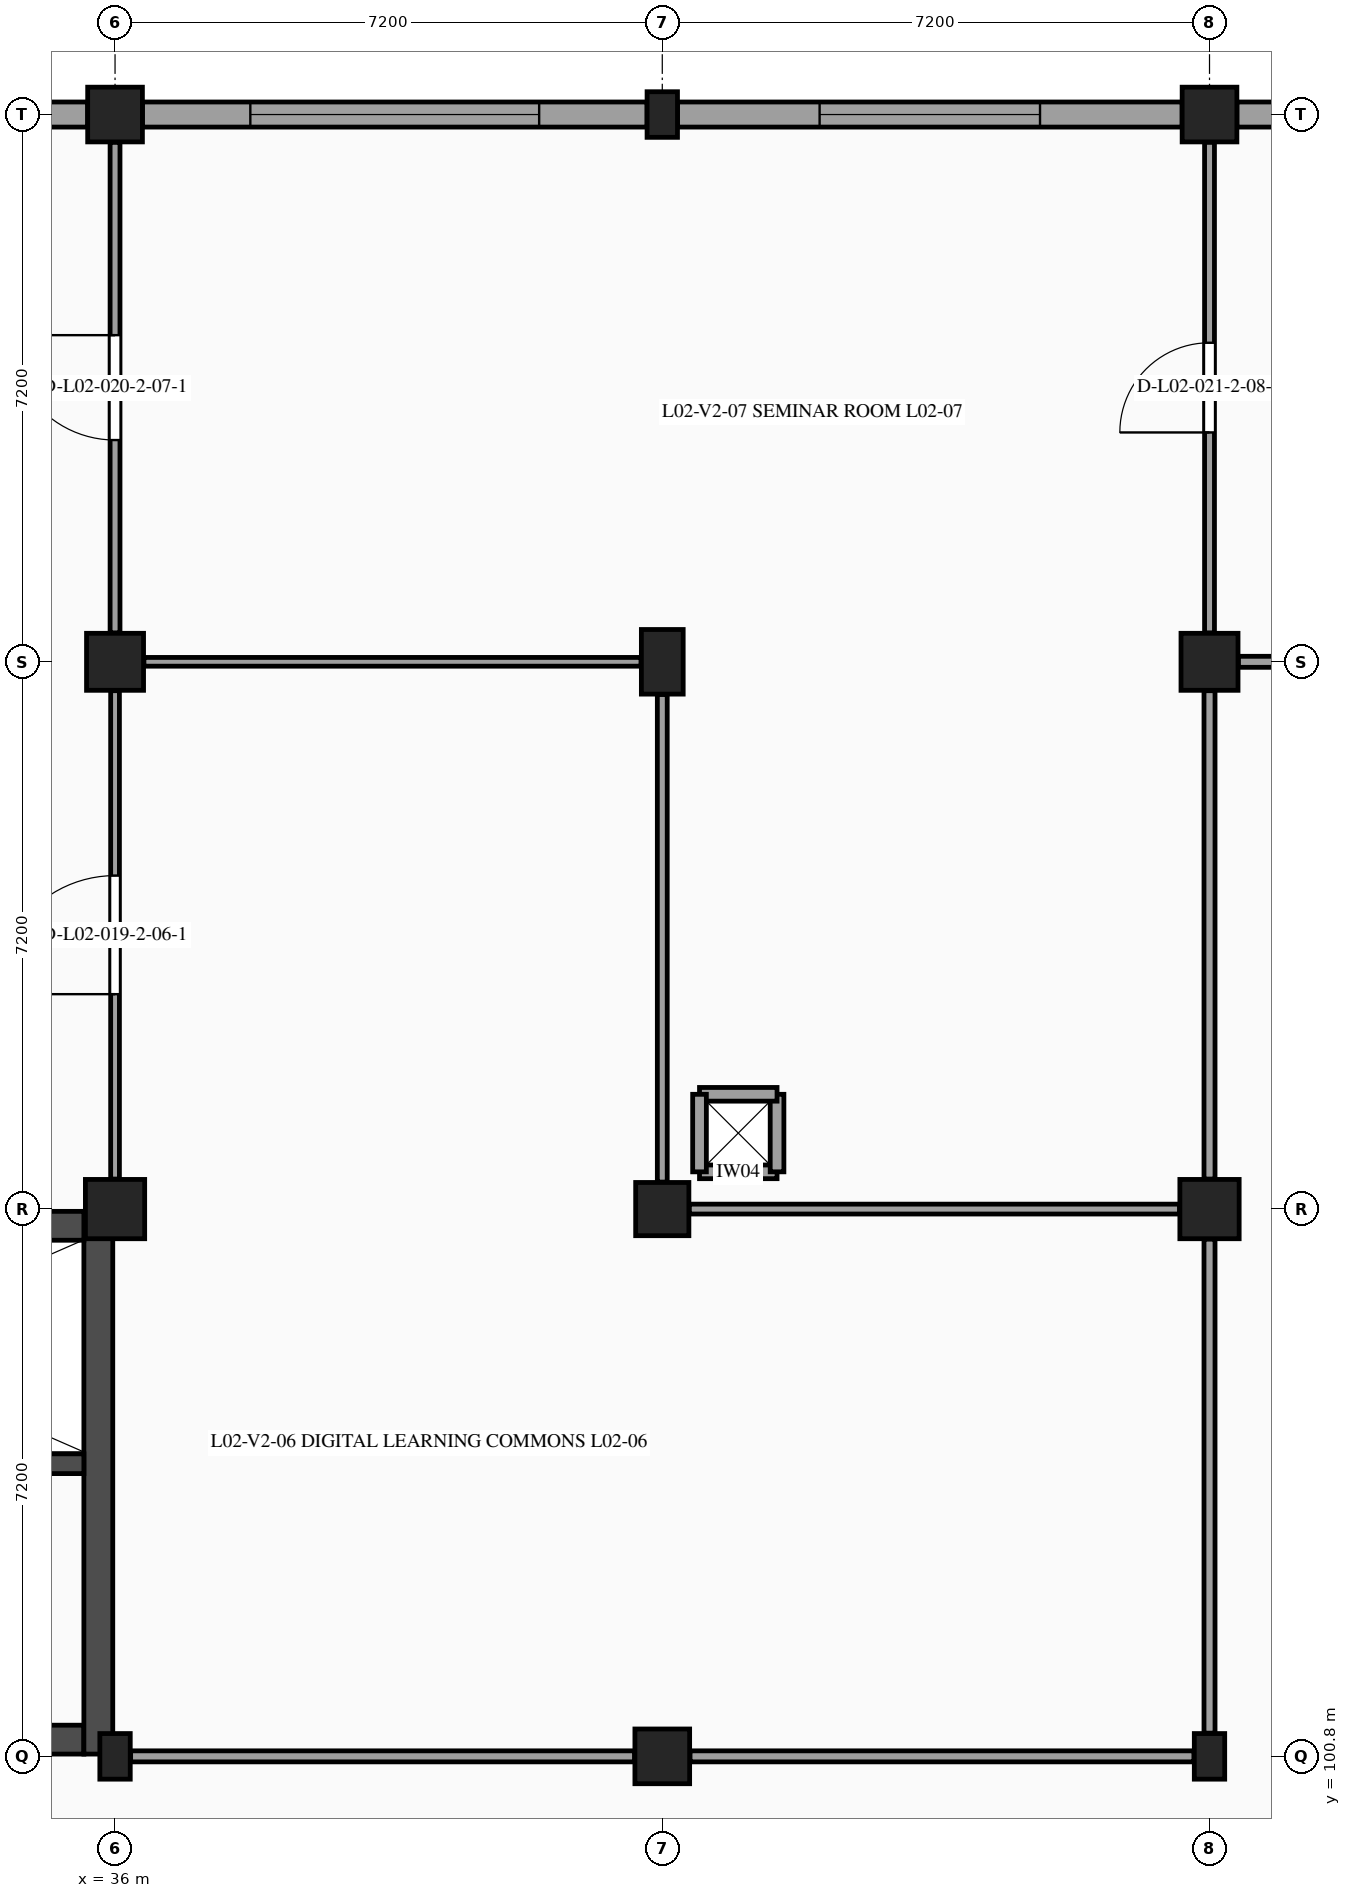
"""IFC4 building model, lengths in metres.
Left out: names, types, materials, properties, quantities, classifications, styles, units other than length and angle.
Written with IfcOpenShell. Run it as: python <this file> out.ifc"""

import sys

from ifc_helpers import new_model, si_unit, direction, frame, frame_2d, origin, origin_2d, place, context, subcontext, project, spatial, rectangle, extrude, element, fill, save


model = new_model("IFC4")
c1 = context("Model", 3, precision=1e-05, world=origin(), true_north=direction((0.0, 1.0)))
c2 = subcontext(c1, "Body", "Model", "MODEL_VIEW")
j1 = project(units=[si_unit("LENGTHUNIT", "METRE"), si_unit("PLANEANGLEUNIT", "RADIAN")], contexts=[c1])
p1 = place(None, origin())
s1 = spatial("IfcSite", under=j1, at=p1, CompositionType="ELEMENT")
p2 = place(p1, origin())
s2 = spatial("IfcBuilding", under=s1, at=p2, CompositionType="ELEMENT")
p3 = place(p2, frame((0.0, 0.0, 9.9)))
s3 = spatial("IfcBuildingStorey", under=s2, at=p3, CompositionType="ELEMENT", Elevation=9.9)
p4 = place(p3, frame((36.0, 100.8, 0.0), z_axis=(0.0, 0.0, 1.0), x_axis=(1.0, 0.0, 0.0)))
e1 = element("IfcColumn", 1, at=p4, inside=s3, PredefinedType="PILASTER", context=c2, shape_type="SweptSolid", body=[
    extrude(rectangle(XDim=0.4, YDim=0.6, at=origin_2d()), origin(), (0.0, 0.0, 1.0), 4.5),
])
p5 = place(p3, frame((36.0, 108.0, 0.0), z_axis=(0.0, 0.0, 1.0), x_axis=(1.0, 0.0, 0.0)))
e2 = element("IfcColumn", 2, at=p5, inside=s3, PredefinedType="COLUMN", context=c2, shape_type="SweptSolid", body=[
    extrude(rectangle(XDim=0.78, YDim=0.78, at=origin_2d()), origin(), (0.0, 0.0, 1.0), 4.5),
])
p6 = place(p3, frame((36.0, 115.2, 0.0), z_axis=(0.0, 0.0, 1.0), x_axis=(1.0, 0.0, 0.0)))
e3 = element("IfcColumn", 3, at=p6, inside=s3, PredefinedType="COLUMN", context=c2, shape_type="SweptSolid", body=[
    extrude(rectangle(XDim=0.75, YDim=0.75, at=origin_2d()), origin(), (0.0, 0.0, 1.0), 4.5),
])
for number, where, z_axis, x_axis in (
    (4, (36.0, 122.4, 0.0), (0.0, 0.0, 1.0), (1.0, 0.0, 0.0)),
    (5, (43.2, 100.8, 0.0), (0.0, 0.0, 1.0), (1.0, 0.0, 0.0)),
):
    element("IfcColumn", number, at=place(p3, frame(where, z_axis=z_axis, x_axis=x_axis)), inside=s3, PredefinedType="COLUMN", context=c2, shape_type="SweptSolid", body=[
        extrude(rectangle(XDim=0.72, YDim=0.72, at=origin_2d()), origin(), (0.0, 0.0, 1.0), 4.5),
    ])
p7 = place(p3, frame((43.2, 108.0, 0.0), z_axis=(0.0, 0.0, 1.0), x_axis=(1.0, 0.0, 0.0)))
e6 = element("IfcColumn", 6, at=p7, inside=s3, PredefinedType="COLUMN", context=c2, shape_type="SweptSolid", body=[
    extrude(rectangle(XDim=0.7, YDim=0.7, at=origin_2d()), origin(), (0.0, 0.0, 1.0), 4.5),
])
p8 = place(p3, frame((43.2, 115.2, 0.0), z_axis=(0.0, 0.0, 1.0), x_axis=(1.0, 0.0, 0.0)))
e7 = element("IfcColumn", 7, at=p8, inside=s3, PredefinedType="COLUMN", context=c2, shape_type="SweptSolid", body=[
    extrude(rectangle(XDim=0.55, YDim=0.85, at=origin_2d()), origin(), (0.0, 0.0, 1.0), 4.5),
])
for number, where, z_axis, x_axis in (
    (8, (43.2, 122.4, 0.0), (0.0, 0.0, 1.0), (1.0, 0.0, 0.0)),
    (9, (50.4, 100.8, 0.0), (0.0, 0.0, 1.0), (1.0, 0.0, 0.0)),
):
    element("IfcColumn", number, at=place(p3, frame(where, z_axis=z_axis, x_axis=x_axis)), inside=s3, PredefinedType="PILASTER", context=c2, shape_type="SweptSolid", body=[
        extrude(rectangle(XDim=0.4, YDim=0.6, at=origin_2d()), origin(), (0.0, 0.0, 1.0), 4.5),
    ])
p9 = place(p3, frame((50.4, 108.0, 0.0), z_axis=(0.0, 0.0, 1.0), x_axis=(1.0, 0.0, 0.0)))
e10 = element("IfcColumn", 10, at=p9, inside=s3, PredefinedType="COLUMN", context=c2, shape_type="SweptSolid", body=[
    extrude(rectangle(XDim=0.78, YDim=0.78, at=origin_2d()), origin(), (0.0, 0.0, 1.0), 4.5),
])
p10 = place(p3, frame((50.4, 115.2, 0.0), z_axis=(0.0, 0.0, 1.0), x_axis=(1.0, 0.0, 0.0)))
e11 = element("IfcColumn", 11, at=p10, inside=s3, PredefinedType="COLUMN", context=c2, shape_type="SweptSolid", body=[
    extrude(rectangle(XDim=0.75, YDim=0.75, at=origin_2d()), origin(), (0.0, 0.0, 1.0), 4.5),
])
p11 = place(p3, frame((50.4, 122.4, 0.0), z_axis=(0.0, 0.0, 1.0), x_axis=(1.0, 0.0, 0.0)))
e12 = element("IfcColumn", 12, at=p11, inside=s3, PredefinedType="COLUMN", context=c2, shape_type="SweptSolid", body=[
    extrude(rectangle(XDim=0.72, YDim=0.72, at=origin_2d()), origin(), (0.0, 0.0, 1.0), 4.5),
])
p12 = place(p3, frame((29.0, 122.4, 0.0), z_axis=(0.0, 0.0, 1.0), x_axis=(1.0, 0.0, 0.0)))
e13 = element("IfcWall", 13, at=p12, inside=s3, PredefinedType="STANDARD", context=c2, shape_type="SweptSolid", body=[
    extrude(rectangle(XDim=6.64, YDim=0.33, at=frame_2d((3.32, 0.0))), origin(), (0.0, 0.0, 1.0), 3.47),
])
p13 = place(p12, frame((1.12, 0.0, 0.98)))
e14 = element("IfcOpeningElement", 14, at=p13, cuts=e13, PredefinedType="OPENING", context=c2, shape_type="SweptSolid", body=[
    extrude(rectangle(XDim=4.4, YDim=1.65, at=frame_2d((2.2, 0.825))), frame((0.0, 0.175, 0.0), z_axis=(0.0, -1.0, 0.0), x_axis=(1.0, 0.0, 0.0)), (0.0, 0.0, 1.0), 0.35),
])
p14 = place(p3, frame((36.36, 122.4, 0.0), z_axis=(0.0, 0.0, 1.0), x_axis=(1.0, 0.0, 0.0)))
e15 = element("IfcWall", 15, at=p14, inside=s3, PredefinedType="STANDARD", context=c2, shape_type="SweptSolid", body=[
    extrude(rectangle(XDim=6.64, YDim=0.33, at=frame_2d((3.32, 0.0))), origin(), (0.0, 0.0, 1.0), 3.47),
])
p15 = place(p14, frame((1.42, 0.0, 0.98)))
e16 = element("IfcOpeningElement", 16, at=p15, cuts=e15, PredefinedType="OPENING", context=c2, shape_type="SweptSolid", body=[
    extrude(rectangle(XDim=3.8, YDim=1.6, at=frame_2d((1.9, 0.8))), frame((0.0, 0.175, 0.0), z_axis=(0.0, -1.0, 0.0), x_axis=(1.0, 0.0, 0.0)), (0.0, 0.0, 1.0), 0.35),
])
p16 = place(p3, frame((43.4, 122.4, 0.0), z_axis=(0.0, 0.0, 1.0), x_axis=(1.0, 0.0, 0.0)))
e17 = element("IfcWall", 17, at=p16, inside=s3, PredefinedType="STANDARD", context=c2, shape_type="SweptSolid", body=[
    extrude(rectangle(XDim=6.64, YDim=0.33, at=frame_2d((3.32, 0.0))), origin(), (0.0, 0.0, 1.0), 3.47),
])
p17 = place(p16, frame((1.87, 0.0, 0.98)))
e18 = element("IfcOpeningElement", 18, at=p17, cuts=e17, PredefinedType="OPENING", context=c2, shape_type="SweptSolid", body=[
    extrude(rectangle(XDim=2.9, YDim=1.6, at=frame_2d((1.45, 0.8))), frame((0.0, 0.175, 0.0), z_axis=(0.0, -1.0, 0.0), x_axis=(1.0, 0.0, 0.0)), (0.0, 0.0, 1.0), 0.35),
])
p18 = place(p3, frame((50.76, 122.4, 0.0), z_axis=(0.0, 0.0, 1.0), x_axis=(1.0, 0.0, 0.0)))
e19 = element("IfcWall", 19, at=p18, inside=s3, PredefinedType="STANDARD", context=c2, shape_type="SweptSolid", body=[
    extrude(rectangle(XDim=6.64, YDim=0.33, at=frame_2d((3.32, 0.0))), origin(), (0.0, 0.0, 1.0), 3.47),
])
p19 = place(p18, frame((2.07, 0.0, 0.98)))
e20 = element("IfcOpeningElement", 20, at=p19, cuts=e19, PredefinedType="OPENING", context=c2, shape_type="SweptSolid", body=[
    extrude(rectangle(XDim=2.5, YDim=1.35, at=frame_2d((1.25, 0.675))), frame((0.0, 0.175, 0.0), z_axis=(0.0, -1.0, 0.0), x_axis=(1.0, 0.0, 0.0)), (0.0, 0.0, 1.0), 0.35),
])
p20 = place(p3, frame((28.99, 101.02, 0.0), z_axis=(0.0, 0.0, 1.0), x_axis=(1.0, 0.0, 0.0)))
e21 = element("IfcWall", 21, at=p20, inside=s3, PredefinedType="SHEAR", context=c2, shape_type="SweptSolid", body=[
    extrude(rectangle(XDim=6.6, YDim=0.38, at=frame_2d((3.3, 0.0))), origin(), (0.0, 0.0, 1.0), 4.225),
])
p21 = place(p20, frame((2.22, 0.0, 0.0)))
e22 = element("IfcOpeningElement", 22, at=p21, cuts=e21, PredefinedType="OPENING", context=c2, shape_type="SweptSolid", body=[
    extrude(rectangle(XDim=1.8, YDim=2.2, at=frame_2d((0.9, 1.1))), frame((0.0, 0.2, 0.0), z_axis=(0.0, -1.0, 0.0), x_axis=(1.0, 0.0, 0.0)), (0.0, 0.0, 1.0), 0.4),
])
p22 = place(p3, frame((35.78, 100.83, 0.0), z_axis=(0.0, 0.0, 1.0), x_axis=(0.0, 1.0, 0.0)))
e23 = element("IfcWall", 23, at=p22, inside=s3, PredefinedType="SHEAR", context=c2, shape_type="SweptSolid", body=[
    extrude(rectangle(XDim=7.14, YDim=0.38, at=frame_2d((3.57, 0.0))), origin(), (0.0, 0.0, 1.0), 4.225),
])
p23 = place(p3, frame((28.99, 107.78, 0.0), z_axis=(0.0, 0.0, 1.0), x_axis=(1.0, 0.0, 0.0)))
e24 = element("IfcWall", 24, at=p23, inside=s3, PredefinedType="SHEAR", context=c2, shape_type="SweptSolid", body=[
    extrude(rectangle(XDim=6.6, YDim=0.38, at=frame_2d((3.3, 0.0))), origin(), (0.0, 0.0, 1.0), 4.225),
])
p24 = place(p3, frame((28.99, 104.65, 0.0), z_axis=(0.0, 0.0, 1.0), x_axis=(1.0, 0.0, 0.0)))
e25 = element("IfcWall", 25, at=p24, inside=s3, PredefinedType="SHEAR", context=c2, shape_type="SweptSolid", body=[
    extrude(rectangle(XDim=6.6, YDim=0.26, at=frame_2d((3.3, 0.0))), origin(), (0.0, 0.0, 1.0), 4.225),
])
p25 = place(p24, frame((0.95, 0.0, 0.0)))
e26 = element("IfcOpeningElement", 26, at=p25, cuts=e25, PredefinedType="OPENING", context=c2, shape_type="SweptSolid", body=[
    extrude(rectangle(XDim=1.1, YDim=2.2, at=frame_2d((0.55, 1.1))), frame((0.0, 0.14, 0.0), z_axis=(0.0, -1.0, 0.0), x_axis=(1.0, 0.0, 0.0)), (0.0, 0.0, 1.0), 0.28),
])
p26 = place(p24, frame((4.1, 0.0, 0.0)))
e27 = element("IfcOpeningElement", 27, at=p26, cuts=e25, PredefinedType="OPENING", context=c2, shape_type="SweptSolid", body=[
    extrude(rectangle(XDim=1.0, YDim=2.15, at=frame_2d((0.5, 1.075))), frame((0.0, 0.14, 0.0), z_axis=(0.0, -1.0, 0.0), x_axis=(1.0, 0.0, 0.0)), (0.0, 0.0, 1.0), 0.28),
])
for number, where, z_axis, x_axis in (
    (28, (43.69, 108.49, 0.0), (0.0, 0.0, 1.0), (1.0, 0.0, 0.0)),
    (29, (44.71, 108.49, 0.0), (0.0, 0.0, 1.0), (0.0, 1.0, 0.0)),
    (30, (44.71, 109.51, 0.0), (0.0, 0.0, 1.0), (-1.0, 0.0, 0.0)),
    (31, (43.69, 109.51, 0.0), (0.0, 0.0, 1.0), (0.0, -1.0, 0.0)),
):
    element("IfcWall", number, at=place(p3, frame(where, z_axis=z_axis, x_axis=x_axis)), inside=s3, PredefinedType="PARTITIONING", context=c2, shape_type="SweptSolid", body=[
        extrude(rectangle(XDim=1.02, YDim=0.18, at=frame_2d((0.51, 0.0))), origin(), (0.0, 0.0, 1.0), 4.225),
    ])
p27 = place(p3, frame((36.0, 108.395, 0.0), z_axis=(0.0, 0.0, 1.0), x_axis=(0.0, 1.0, 0.0)))
e32 = element("IfcWall", 32, at=p27, inside=s3, PredefinedType="PARTITIONING", context=c2, shape_type="SweptSolid", body=[
    extrude(rectangle(XDim=6.425, YDim=0.115, at=frame_2d((3.212, 0.0))), origin(), (0.0, 0.0, 1.0), 3.535),
])
p28 = place(p27, frame((2.433, 0.0, 0.0)))
e33 = element("IfcOpeningElement", 33, at=p28, cuts=e32, PredefinedType="OPENING", context=c2, shape_type="SweptSolid", body=[
    extrude(rectangle(XDim=1.56, YDim=2.25, at=frame_2d((0.78, 1.125))), frame((0.0, 0.067, 0.0), z_axis=(0.0, -1.0, 0.0), x_axis=(1.0, 0.0, 0.0)), (0.0, 0.0, 1.0), 0.135),
])
p29 = place(p3, frame((36.0, 115.58, 0.0), z_axis=(0.0, 0.0, 1.0), x_axis=(0.0, 1.0, 0.0)))
e34 = element("IfcWall", 34, at=p29, inside=s3, PredefinedType="PARTITIONING", context=c2, shape_type="SweptSolid", body=[
    extrude(rectangle(XDim=6.455, YDim=0.13, at=frame_2d((3.228, 0.0))), origin(), (0.0, 0.0, 1.0), 3.53),
])
p30 = place(p29, frame((2.538, 0.0, 0.0)))
e35 = element("IfcOpeningElement", 35, at=p30, cuts=e34, PredefinedType="OPENING", context=c2, shape_type="SweptSolid", body=[
    extrude(rectangle(XDim=1.38, YDim=2.22, at=frame_2d((0.69, 1.11))), frame((0.0, 0.075, 0.0), z_axis=(0.0, -1.0, 0.0), x_axis=(1.0, 0.0, 0.0)), (0.0, 0.0, 1.0), 0.15),
])
p31 = place(p3, frame((36.205, 100.8, 0.0), z_axis=(0.0, 0.0, 1.0), x_axis=(1.0, 0.0, 0.0)))
e36 = element("IfcWall", 36, at=p31, inside=s3, PredefinedType="PARTITIONING", context=c2, shape_type="SweptSolid", body=[
    extrude(rectangle(XDim=6.63, YDim=0.145, at=frame_2d((3.315, 0.0))), origin(), (0.0, 0.0, 1.0), 3.575),
])
p32 = place(p3, frame((43.2, 108.355, 0.0), z_axis=(0.0, 0.0, 1.0), x_axis=(0.0, 1.0, 0.0)))
e37 = element("IfcWall", 37, at=p32, inside=s3, PredefinedType="PARTITIONING", context=c2, shape_type="SweptSolid", body=[
    extrude(rectangle(XDim=6.415, YDim=0.13, at=frame_2d((3.208, 0.0))), origin(), (0.0, 0.0, 1.0), 3.535),
])
p33 = place(p3, frame((36.38, 115.2, 0.0), z_axis=(0.0, 0.0, 1.0), x_axis=(1.0, 0.0, 0.0)))
e38 = element("IfcWall", 38, at=p33, inside=s3, PredefinedType="PARTITIONING", context=c2, shape_type="SweptSolid", body=[
    extrude(rectangle(XDim=6.54, YDim=0.115, at=frame_2d((3.27, 0.0))), origin(), (0.0, 0.0, 1.0), 3.575),
])
p34 = place(p3, frame((43.565, 100.8, 0.0), z_axis=(0.0, 0.0, 1.0), x_axis=(1.0, 0.0, 0.0)))
e39 = element("IfcWall", 39, at=p34, inside=s3, PredefinedType="PARTITIONING", context=c2, shape_type="SweptSolid", body=[
    extrude(rectangle(XDim=6.63, YDim=0.145, at=frame_2d((3.315, 0.0))), origin(), (0.0, 0.0, 1.0), 3.585),
])
p35 = place(p3, frame((50.4, 101.105, 0.0), z_axis=(0.0, 0.0, 1.0), x_axis=(0.0, 1.0, 0.0)))
e40 = element("IfcWall", 40, at=p35, inside=s3, PredefinedType="PARTITIONING", context=c2, shape_type="SweptSolid", body=[
    extrude(rectangle(XDim=6.5, YDim=0.145, at=frame_2d((3.25, 0.0))), origin(), (0.0, 0.0, 1.0), 3.54),
])
p36 = place(p3, frame((43.555, 108.0, 0.0), z_axis=(0.0, 0.0, 1.0), x_axis=(1.0, 0.0, 0.0)))
e41 = element("IfcWall", 41, at=p36, inside=s3, PredefinedType="PARTITIONING", context=c2, shape_type="SweptSolid", body=[
    extrude(rectangle(XDim=6.45, YDim=0.13, at=frame_2d((3.225, 0.0))), origin(), (0.0, 0.0, 1.0), 3.585),
])
p37 = place(p3, frame((50.4, 108.395, 0.0), z_axis=(0.0, 0.0, 1.0), x_axis=(0.0, 1.0, 0.0)))
e42 = element("IfcWall", 42, at=p37, inside=s3, PredefinedType="PARTITIONING", context=c2, shape_type="SweptSolid", body=[
    extrude(rectangle(XDim=6.425, YDim=0.145, at=frame_2d((3.212, 0.0))), origin(), (0.0, 0.0, 1.0), 3.535),
])
p38 = place(p3, frame((50.4, 115.58, 0.0), z_axis=(0.0, 0.0, 1.0), x_axis=(0.0, 1.0, 0.0)))
e43 = element("IfcWall", 43, at=p38, inside=s3, PredefinedType="PARTITIONING", context=c2, shape_type="SweptSolid", body=[
    extrude(rectangle(XDim=6.455, YDim=0.13, at=frame_2d((3.228, 0.0))), origin(), (0.0, 0.0, 1.0), 3.53),
])
p39 = place(p38, frame((2.637, 0.0, 0.0)))
e44 = element("IfcOpeningElement", 44, at=p39, cuts=e43, PredefinedType="OPENING", context=c2, shape_type="SweptSolid", body=[
    extrude(rectangle(XDim=1.18, YDim=2.18, at=frame_2d((0.59, 1.09))), frame((0.0, 0.075, 0.0), z_axis=(0.0, -1.0, 0.0), x_axis=(1.0, 0.0, 0.0)), (0.0, 0.0, 1.0), 0.15),
])
p40 = place(p3, frame((50.78, 115.2, 0.0), z_axis=(0.0, 0.0, 1.0), x_axis=(1.0, 0.0, 0.0)))
e45 = element("IfcWall", 45, at=p40, inside=s3, PredefinedType="PARTITIONING", context=c2, shape_type="SweptSolid", body=[
    extrude(rectangle(XDim=6.54, YDim=0.145, at=frame_2d((3.27, 0.0))), origin(), (0.0, 0.0, 1.0), 3.425),
])
p41 = place(p15, origin())
e46 = element("IfcWindow", 46, at=p41, inside=s3, PartitioningType="SINGLE_PANEL", PredefinedType="WINDOW", context=c2, shape_type="SweptSolid", body=[
    extrude(rectangle(XDim=3.8, YDim=1.6, at=frame_2d((1.9, 0.8))), frame((0.0, -0.03, 0.0), z_axis=(0.0, -1.0, 0.0), x_axis=(1.0, 0.0, 0.0)), (0.0, 0.0, 1.0), 0.06),
])
fill(e16, e46)
p42 = place(p17, origin())
e47 = element("IfcWindow", 47, at=p42, inside=s3, PartitioningType="SINGLE_PANEL", PredefinedType="WINDOW", context=c2, shape_type="SweptSolid", body=[
    extrude(rectangle(XDim=2.9, YDim=1.6, at=frame_2d((1.45, 0.8))), frame((0.0, -0.03, 0.0), z_axis=(0.0, -1.0, 0.0), x_axis=(1.0, 0.0, 0.0)), (0.0, 0.0, 1.0), 0.06),
])
fill(e18, e47)
p43 = place(p28, origin())
e48 = element("IfcDoor", 48, at=p43, inside=s3, OperationType="SINGLE_SWING_LEFT", PredefinedType="DOOR", context=c2, shape_type="SweptSolid", body=[
    extrude(rectangle(XDim=1.56, YDim=2.25, at=frame_2d((0.78, 1.125))), frame((0.0, 0.025, 0.0), z_axis=(0.0, -1.0, 0.0), x_axis=(1.0, 0.0, 0.0)), (0.0, 0.0, 1.0), 0.05),
])
fill(e33, e48)
p44 = place(p30, origin())
e49 = element("IfcDoor", 49, at=p44, inside=s3, OperationType="SINGLE_SWING_RIGHT", PredefinedType="DOOR", context=c2, shape_type="SweptSolid", body=[
    extrude(rectangle(XDim=1.38, YDim=2.22, at=frame_2d((0.69, 1.11))), frame((0.0, 0.025, 0.0), z_axis=(0.0, -1.0, 0.0), x_axis=(1.0, 0.0, 0.0)), (0.0, 0.0, 1.0), 0.05),
])
fill(e35, e49)
p45 = place(p39, origin())
e50 = element("IfcDoor", 50, at=p45, inside=s3, OperationType="SINGLE_SWING_LEFT", PredefinedType="DOOR", context=c2, shape_type="SweptSolid", body=[
    extrude(rectangle(XDim=1.18, YDim=2.18, at=frame_2d((0.59, 1.09))), frame((0.0, 0.025, 0.0), z_axis=(0.0, -1.0, 0.0), x_axis=(1.0, 0.0, 0.0)), (0.0, 0.0, 1.0), 0.05),
])
fill(e44, e50)
save(model, sys.argv[1])
